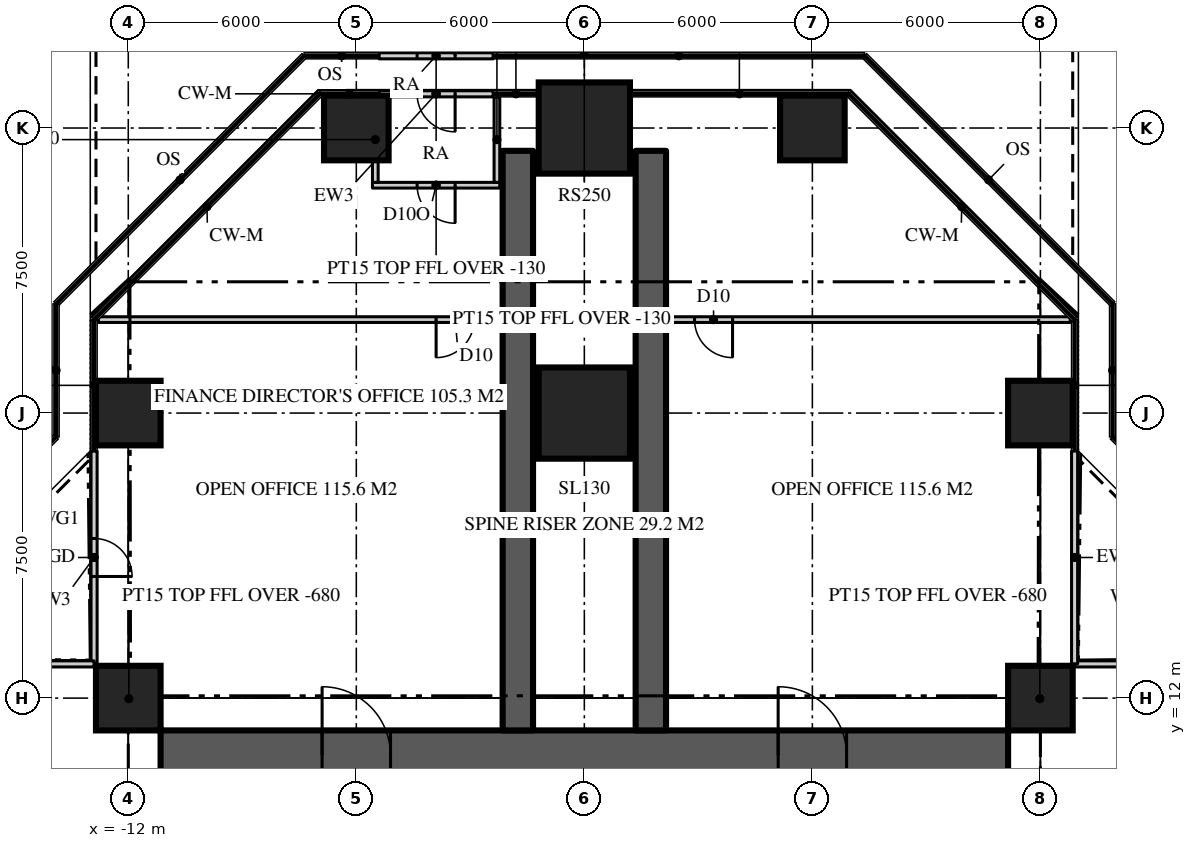
"""IFC4 building model, lengths in metres.
Left out: names, types, materials, properties, quantities, classifications, styles, units other than length and angle.
Written with IfcOpenShell. Run it as: python <this file> out.ifc"""

import sys

from ifc_helpers import new_model, si_unit, direction, frame, frame_2d, origin, origin_2d, place, context, subcontext, project, spatial, rectangle, extrude, element, fill, save


model = new_model("IFC4")
c1 = context("Model", 3, precision=1e-05, world=origin(), true_north=direction((0.0, 1.0)))
c2 = subcontext(c1, "Body", "Model", "MODEL_VIEW")
j1 = project(units=[si_unit("LENGTHUNIT", "METRE"), si_unit("PLANEANGLEUNIT", "RADIAN")], contexts=[c1])
p1 = place(None, origin())
s1 = spatial("IfcSite", under=j1, at=p1, CompositionType="ELEMENT")
p2 = place(p1, origin())
s2 = spatial("IfcBuilding", under=s1, at=p2, CompositionType="ELEMENT")
p3 = place(p2, frame((0.0, 0.0, 124.2)))
s3 = spatial("IfcBuildingStorey", under=s2, at=p3, CompositionType="ELEMENT", Elevation=124.2)
p4 = place(p3, frame((-11.15, 10.5, 0.0), z_axis=(0.0, 0.0, 1.0), x_axis=(1.0, 0.0, 0.0)))
e1 = element("IfcWall", 1, at=p4, inside=s3, PredefinedType="SHEAR", context=c2, shape_type="SweptSolid", body=[
    extrude(rectangle(XDim=22.3, YDim=1.3, at=frame_2d((11.15, 0.0))), origin(), (0.0, 0.0, 1.0), 3.9),
])
p5 = place(p4, frame((4.25, 0.0, 0.0)))
e2 = element("IfcOpeningElement", 2, at=p5, cuts=e1, PredefinedType="OPENING", context=c2, shape_type="SweptSolid", body=[
    extrude(rectangle(XDim=1.8, YDim=2.2, at=frame_2d((0.9, 1.1))), frame((0.0, 0.66, 0.0), z_axis=(0.0, -1.0, 0.0), x_axis=(1.0, 0.0, 0.0)), (0.0, 0.0, 1.0), 1.32),
])
p6 = place(p4, frame((16.25, 0.0, 0.0)))
e3 = element("IfcOpeningElement", 3, at=p6, cuts=e1, PredefinedType="OPENING", context=c2, shape_type="SweptSolid", body=[
    extrude(rectangle(XDim=1.8, YDim=2.2, at=frame_2d((0.9, 1.1))), frame((0.0, 0.66, 0.0), z_axis=(0.0, -1.0, 0.0), x_axis=(1.0, 0.0, 0.0)), (0.0, 0.0, 1.0), 1.32),
])
for number, where, z_axis, x_axis in (
    (4, (1.75, 11.15, 0.0), (0.0, 0.0, 1.0), (0.0, 1.0, 0.0)),
    (5, (-1.75, 11.15, 0.0), (0.0, 0.0, 1.0), (0.0, 1.0, 0.0)),
):
    element("IfcWall", number, at=place(p3, frame(where, z_axis=z_axis, x_axis=x_axis)), inside=s3, PredefinedType="SHEAR", context=c2, shape_type="SweptSolid", body=[
        extrude(rectangle(XDim=15.25, YDim=0.8, at=frame_2d((7.625, 0.0))), origin(), (0.0, 0.0, 1.0), 3.9),
    ])
for number, where, z_axis, x_axis in (
    (6, (-12.0, 12.0, 0.0), (0.0, 0.0, 1.0), (1.0, 0.0, 0.0)),
    (7, (12.0, 12.0, 0.0), (0.0, 0.0, 1.0), (1.0, 0.0, 0.0)),
    (8, (-12.0, 19.5, 0.0), (0.0, 0.0, 1.0), (1.0, 0.0, 0.0)),
):
    element("IfcColumn", number, at=place(p3, frame(where, z_axis=z_axis, x_axis=x_axis)), inside=s3, PredefinedType="COLUMN", context=c2, shape_type="SweptSolid", body=[
        extrude(rectangle(XDim=1.7, YDim=1.7, at=origin_2d()), origin(), (0.0, 0.0, 1.0), 3.9),
    ])
p7 = place(p3, frame((0.0, 19.5, 0.0), z_axis=(0.0, 0.0, 1.0), x_axis=(1.0, 0.0, 0.0)))
e9 = element("IfcColumn", 9, at=p7, inside=s3, PredefinedType="COLUMN", context=c2, shape_type="SweptSolid", body=[
    extrude(rectangle(XDim=2.4, YDim=2.4, at=origin_2d()), origin(), (0.0, 0.0, 1.0), 3.9),
])
p8 = place(p3, frame((12.0, 19.5, 0.0), z_axis=(0.0, 0.0, 1.0), x_axis=(1.0, 0.0, 0.0)))
e10 = element("IfcColumn", 10, at=p8, inside=s3, PredefinedType="COLUMN", context=c2, shape_type="SweptSolid", body=[
    extrude(rectangle(XDim=1.7, YDim=1.7, at=origin_2d()), origin(), (0.0, 0.0, 1.0), 3.9),
])
p9 = place(p3, frame((-6.0, 27.0, -0.13), z_axis=(0.0, 0.0, 1.0), x_axis=(1.0, 0.0, 0.0)))
e11 = element("IfcColumn", 11, at=p9, inside=s3, PredefinedType="COLUMN", context=c2, shape_type="SweptSolid", body=[
    extrude(rectangle(XDim=1.7, YDim=1.7, at=origin_2d()), origin(), (0.0, 0.0, 1.0), 4.03),
])
p10 = place(p3, frame((0.0, 27.0, 0.0), z_axis=(0.0, 0.0, 1.0), x_axis=(1.0, 0.0, 0.0)))
e12 = element("IfcColumn", 12, at=p10, inside=s3, PredefinedType="COLUMN", context=c2, shape_type="SweptSolid", body=[
    extrude(rectangle(XDim=2.4, YDim=2.4, at=origin_2d()), origin(), (0.0, 0.0, 1.0), 3.9),
])
p11 = place(p3, frame((6.0, 27.0, -0.13), z_axis=(0.0, 0.0, 1.0), x_axis=(1.0, 0.0, 0.0)))
e13 = element("IfcColumn", 13, at=p11, inside=s3, PredefinedType="COLUMN", context=c2, shape_type="SweptSolid", body=[
    extrude(rectangle(XDim=1.7, YDim=1.7, at=origin_2d()), origin(), (0.0, 0.0, 1.0), 4.03),
])
p12 = place(p3, frame((18.5, 12.9, 0.0), z_axis=(0.0, 0.0, 1.0), x_axis=(-1.0, 0.0, 0.0)))
e14 = element("IfcWall", 14, at=p12, inside=s3, PredefinedType="SOLIDWALL", context=c2, shape_type="SweptSolid", body=[
    extrude(rectangle(XDim=5.6, YDim=0.16, at=frame_2d((2.8, 0.0))), origin(), (0.0, 0.0, 1.0), 3.77),
])
p13 = place(p12, frame((2.3, 0.0, 0.0)))
e15 = element("IfcOpeningElement", 15, at=p13, cuts=e14, PredefinedType="OPENING", context=c2, shape_type="SweptSolid", body=[
    extrude(rectangle(XDim=1.0, YDim=2.2, at=frame_2d((0.5, 1.1))), frame((0.0, 0.09, 0.0), z_axis=(0.0, -1.0, 0.0), x_axis=(1.0, 0.0, 0.0)), (0.0, 0.0, 1.0), 0.18),
])
p14 = place(p3, frame((12.9, 12.9, 0.0), z_axis=(0.0, 0.0, 1.0), x_axis=(0.0, 1.0, 0.0)))
e16 = element("IfcWall", 16, at=p14, inside=s3, PredefinedType="SOLIDWALL", context=c2, shape_type="SweptSolid", body=[
    extrude(rectangle(XDim=5.6, YDim=0.16, at=frame_2d((2.8, 0.0))), origin(), (0.0, 0.0, 1.0), 3.77),
])
p15 = place(p3, frame((-2.4, 27.9, 0.0), z_axis=(0.0, 0.0, 1.0), x_axis=(-1.0, 0.0, 0.0)))
e17 = element("IfcWall", 17, at=p15, inside=s3, PredefinedType="SOLIDWALL", context=c2, shape_type="SweptSolid", body=[
    extrude(rectangle(XDim=3.0, YDim=0.16, at=frame_2d((1.5, 0.0))), origin(), (0.0, 0.0, 1.0), 3.77),
])
p16 = place(p15, frame((1.0, 0.0, 0.0)))
e18 = element("IfcOpeningElement", 18, at=p16, cuts=e17, PredefinedType="OPENING", context=c2, shape_type="SweptSolid", body=[
    extrude(rectangle(XDim=1.0, YDim=2.2, at=frame_2d((0.5, 1.1))), frame((0.0, 0.09, 0.0), z_axis=(0.0, -1.0, 0.0), x_axis=(1.0, 0.0, 0.0)), (0.0, 0.0, 1.0), 0.18),
])
p17 = place(p3, frame((-12.9, 18.5, 0.0), z_axis=(0.0, 0.0, 1.0), x_axis=(0.0, -1.0, 0.0)))
e19 = element("IfcWall", 19, at=p17, inside=s3, PredefinedType="SOLIDWALL", context=c2, shape_type="SweptSolid", body=[
    extrude(rectangle(XDim=5.6, YDim=0.16, at=frame_2d((2.8, 0.0))), origin(), (0.0, 0.0, 1.0), 3.77),
])
p18 = place(p17, frame((2.3, 0.0, 0.0)))
e20 = element("IfcOpeningElement", 20, at=p18, cuts=e19, PredefinedType="OPENING", context=c2, shape_type="SweptSolid", body=[
    extrude(rectangle(XDim=1.0, YDim=2.2, at=frame_2d((0.5, 1.1))), frame((0.0, 0.09, 0.0), z_axis=(0.0, -1.0, 0.0), x_axis=(1.0, 0.0, 0.0)), (0.0, 0.0, 1.0), 0.18),
])
p19 = place(p3, frame((-12.9, 12.9, 0.0), z_axis=(0.0, 0.0, 1.0), x_axis=(-1.0, 0.0, 0.0)))
e21 = element("IfcWall", 21, at=p19, inside=s3, PredefinedType="SOLIDWALL", context=c2, shape_type="SweptSolid", body=[
    extrude(rectangle(XDim=5.6, YDim=0.16, at=frame_2d((2.8, 0.0))), origin(), (0.0, 0.0, 1.0), 3.77),
])
p20 = place(p3, frame((-5.4, 28.9, 0.0), z_axis=(0.0, 0.0, 1.0), x_axis=(1.0, 0.0, 0.0)))
e22 = element("IfcWall", 22, at=p20, inside=s3, PredefinedType="SOLIDWALL", context=c2, shape_type="SweptSolid", body=[
    extrude(rectangle(XDim=3.0, YDim=0.16, at=frame_2d((1.5, 0.0))), origin(), (0.0, 0.0, 1.0), 3.9),
])
p21 = place(p20, frame((1.0, 0.0, 0.0)))
e23 = element("IfcOpeningElement", 23, at=p21, cuts=e22, PredefinedType="OPENING", context=c2, shape_type="SweptSolid", body=[
    extrude(rectangle(XDim=1.0, YDim=2.2, at=frame_2d((0.5, 1.1))), frame((0.0, 0.09, 0.0), z_axis=(0.0, -1.0, 0.0), x_axis=(1.0, 0.0, 0.0)), (0.0, 0.0, 1.0), 0.18),
])
p22 = place(p3, frame((12.786, 21.959, 0.0), z_axis=(0.0, 0.0, 1.0), x_axis=(-1.0, 0.0, 0.0)))
e24 = element("IfcWall", 24, at=p22, inside=s3, PredefinedType="PARTITIONING", context=c2, shape_type="SweptSolid", body=[
    extrude(rectangle(XDim=25.573, YDim=0.15, at=frame_2d((12.786, 0.0))), origin(), (0.0, 0.0, 1.0), 3.77),
])
p23 = place(p22, frame((15.687, 0.0, 0.0)))
e25 = element("IfcOpeningElement", 25, at=p23, cuts=e24, PredefinedType="OPENING", context=c2, shape_type="SweptSolid", body=[
    extrude(rectangle(XDim=1.0, YDim=2.2, at=frame_2d((0.5, 1.1))), frame((0.0, 0.085, 0.0), z_axis=(0.0, -1.0, 0.0), x_axis=(1.0, 0.0, 0.0)), (0.0, 0.0, 1.0), 0.17),
])
p24 = place(p22, frame((8.886, 0.0, 0.0)))
e26 = element("IfcOpeningElement", 26, at=p24, cuts=e24, PredefinedType="OPENING", context=c2, shape_type="SweptSolid", body=[
    extrude(rectangle(XDim=1.0, YDim=2.2, at=frame_2d((0.5, 1.1))), frame((0.0, 0.085, 0.0), z_axis=(0.0, -1.0, 0.0), x_axis=(1.0, 0.0, 0.0)), (0.0, 0.0, 1.0), 0.17),
])
p25 = place(p3, frame((-2.225, 25.495, 0.0), z_axis=(0.0, 0.0, 1.0), x_axis=(-1.0, 0.0, 0.0)))
e27 = element("IfcWall", 27, at=p25, inside=s3, PredefinedType="PARTITIONING", context=c2, shape_type="SweptSolid", body=[
    extrude(rectangle(XDim=3.35, YDim=0.15, at=frame_2d((1.675, 0.0))), origin(), (0.0, 0.0, 1.0), 3.77),
])
p26 = place(p25, frame((1.175, 0.0, 0.0)))
e28 = element("IfcOpeningElement", 28, at=p26, cuts=e27, PredefinedType="OPENING", context=c2, shape_type="SweptSolid", body=[
    extrude(rectangle(XDim=1.0, YDim=2.2, at=frame_2d((0.5, 1.1))), frame((0.0, 0.085, 0.0), z_axis=(0.0, -1.0, 0.0), x_axis=(1.0, 0.0, 0.0)), (0.0, 0.0, 1.0), 0.17),
])
for number, where, z_axis, x_axis in (
    (29, (-2.3, 25.57, 0.0), (0.0, 0.0, 1.0), (0.0, 1.0, 0.0)),
    (30, (-5.5, 25.57, 0.0), (0.0, 0.0, 1.0), (0.0, 1.0, 0.0)),
):
    element("IfcWall", number, at=place(p3, frame(where, z_axis=z_axis, x_axis=x_axis)), inside=s3, PredefinedType="PARTITIONING", context=c2, shape_type="SweptSolid", body=[
        extrude(rectangle(XDim=2.25, YDim=0.15, at=frame_2d((1.125, 0.0))), origin(), (0.0, 0.0, 1.0), 3.77),
    ])
for number, where, z_axis, x_axis in (
    (31, (11.15, 11.15, 0.0), (0.0, 0.0, 1.0), (0.707, 0.707, 0.0)),
    (32, (-11.15, 11.15, 0.0), (0.0, 0.0, 1.0), (-0.707, 0.707, 0.0)),
):
    element("IfcWall", number, at=place(p3, frame(where, z_axis=z_axis, x_axis=x_axis)), inside=s3, PredefinedType="PARTITIONING", context=c2, shape_type="SweptSolid", body=[
        extrude(rectangle(XDim=2.362, YDim=0.15, at=frame_2d((1.181, 0.0))), origin(), (0.0, 0.0, 1.0), 3.22),
    ])
p27 = place(p16, origin())
e33 = element("IfcDoor", 33, at=p27, inside=s3, OperationType="SINGLE_SWING_LEFT", PredefinedType="DOOR", context=c2, shape_type="SweptSolid", body=[
    extrude(rectangle(XDim=1.0, YDim=2.2, at=frame_2d((0.5, 1.1))), frame((0.0, 0.025, 0.0), z_axis=(0.0, -1.0, 0.0), x_axis=(1.0, 0.0, 0.0)), (0.0, 0.0, 1.0), 0.05),
])
fill(e18, e33)
p28 = place(p18, origin())
e34 = element("IfcDoor", 34, at=p28, inside=s3, OperationType="SINGLE_SWING_RIGHT", PredefinedType="DOOR", context=c2, shape_type="SweptSolid", body=[
    extrude(rectangle(XDim=1.0, YDim=2.2, at=frame_2d((0.5, 1.1))), frame((0.0, 0.025, 0.0), z_axis=(0.0, -1.0, 0.0), x_axis=(1.0, 0.0, 0.0)), (0.0, 0.0, 1.0), 0.05),
])
fill(e20, e34)
p29 = place(p21, origin())
e35 = element("IfcDoor", 35, at=p29, inside=s3, OperationType="SINGLE_SWING_RIGHT", PredefinedType="DOOR", context=c2, shape_type="SweptSolid", body=[
    extrude(rectangle(XDim=1.0, YDim=2.2, at=frame_2d((0.5, 1.1))), frame((0.0, 0.025, 0.0), z_axis=(0.0, -1.0, 0.0), x_axis=(1.0, 0.0, 0.0)), (0.0, 0.0, 1.0), 0.05),
])
fill(e23, e35)
p30 = place(p5, origin())
e36 = element("IfcDoor", 36, at=p30, inside=s3, OperationType="DOUBLE_DOOR_DOUBLE_SWING", PredefinedType="DOOR", context=c2, shape_type="SweptSolid", body=[
    extrude(rectangle(XDim=1.8, YDim=2.2, at=frame_2d((0.9, 1.1))), frame((0.0, 0.025, 0.0), z_axis=(0.0, -1.0, 0.0), x_axis=(1.0, 0.0, 0.0)), (0.0, 0.0, 1.0), 0.05),
])
fill(e2, e36)
p31 = place(p6, origin())
e37 = element("IfcDoor", 37, at=p31, inside=s3, OperationType="DOUBLE_DOOR_DOUBLE_SWING", PredefinedType="DOOR", context=c2, shape_type="SweptSolid", body=[
    extrude(rectangle(XDim=1.8, YDim=2.2, at=frame_2d((0.9, 1.1))), frame((0.0, 0.025, 0.0), z_axis=(0.0, -1.0, 0.0), x_axis=(1.0, 0.0, 0.0)), (0.0, 0.0, 1.0), 0.05),
])
fill(e3, e37)
p32 = place(p23, origin())
e38 = element("IfcDoor", 38, at=p32, inside=s3, OperationType="SINGLE_SWING_RIGHT", PredefinedType="DOOR", context=c2, shape_type="SweptSolid", body=[
    extrude(rectangle(XDim=1.0, YDim=2.2, at=frame_2d((0.5, 1.1))), frame((0.0, 0.025, 0.0), z_axis=(0.0, -1.0, 0.0), x_axis=(1.0, 0.0, 0.0)), (0.0, 0.0, 1.0), 0.05),
])
fill(e25, e38)
p33 = place(p24, origin())
e39 = element("IfcDoor", 39, at=p33, inside=s3, OperationType="SINGLE_SWING_LEFT", PredefinedType="DOOR", context=c2, shape_type="SweptSolid", body=[
    extrude(rectangle(XDim=1.0, YDim=2.2, at=frame_2d((0.5, 1.1))), frame((0.0, 0.025, 0.0), z_axis=(0.0, -1.0, 0.0), x_axis=(1.0, 0.0, 0.0)), (0.0, 0.0, 1.0), 0.05),
])
fill(e26, e39)
p34 = place(p26, origin())
e40 = element("IfcDoor", 40, at=p34, inside=s3, OperationType="SINGLE_SWING_LEFT", PredefinedType="DOOR", context=c2, shape_type="SweptSolid", body=[
    extrude(rectangle(XDim=1.0, YDim=2.2, at=frame_2d((0.5, 1.1))), frame((0.0, 0.025, 0.0), z_axis=(0.0, -1.0, 0.0), x_axis=(1.0, 0.0, 0.0)), (0.0, 0.0, 1.0), 0.05),
])
fill(e28, e40)
save(model, sys.argv[1])
